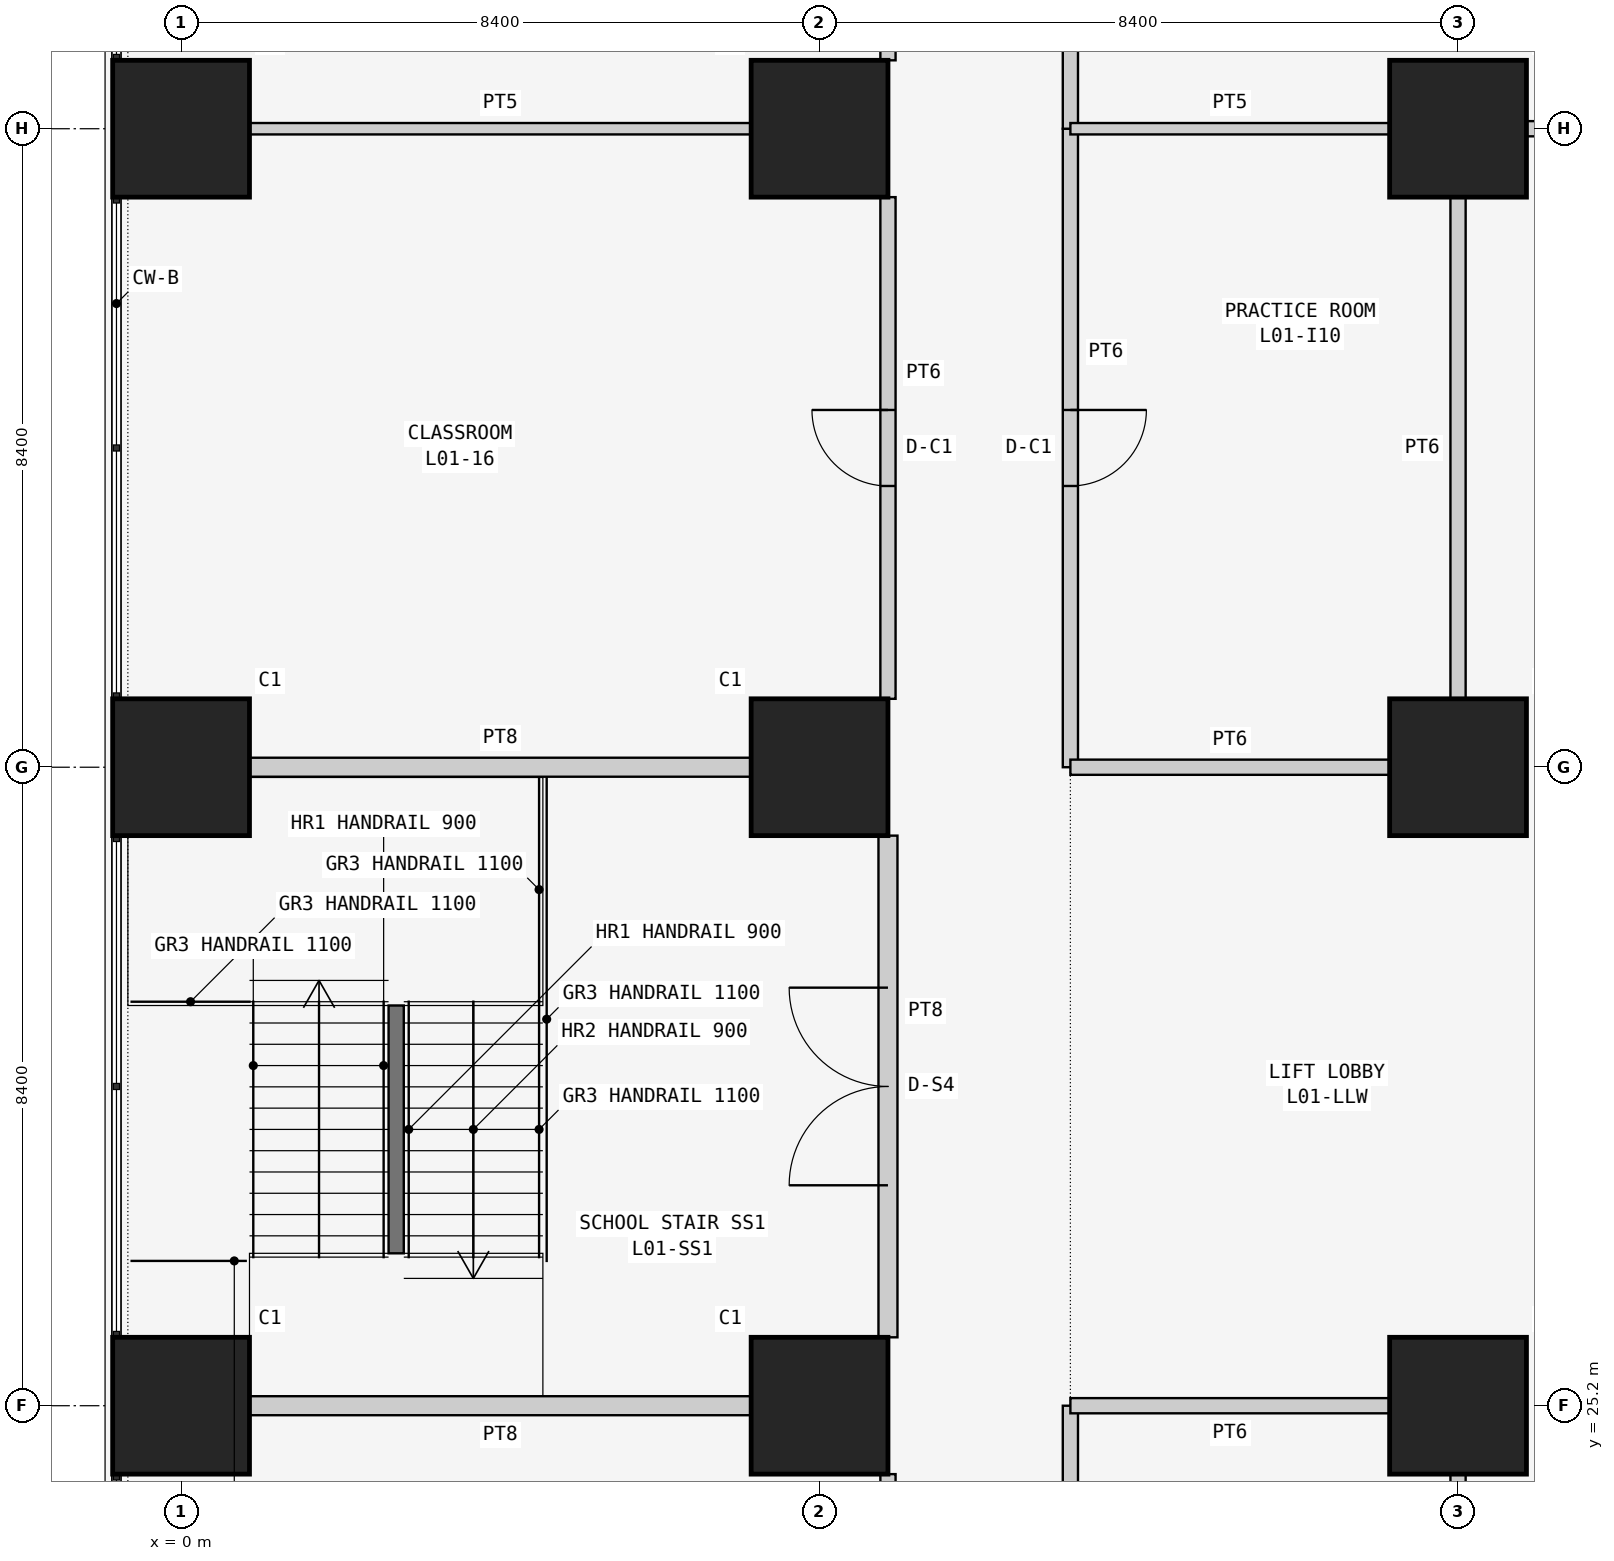
"""IFC4 building model, lengths in metres.
Left out: names, types, materials, properties, quantities, classifications, styles, units other than length and angle.
Written with IfcOpenShell. Run it as: python <this file> out.ifc"""

import sys

from ifc_helpers import new_model, si_unit, direction, frame, frame_2d, origin, origin_2d, place, context, subcontext, project, spatial, rectangle, extrude, element, fill, save


model = new_model("IFC4")
c1 = context("Model", 3, precision=1e-05, world=origin(), true_north=direction((0.0, 1.0)))
c2 = subcontext(c1, "Body", "Model", "MODEL_VIEW")
j1 = project(units=[si_unit("LENGTHUNIT", "METRE"), si_unit("PLANEANGLEUNIT", "RADIAN")], contexts=[c1])
p1 = place(None, origin())
s1 = spatial("IfcSite", under=j1, at=p1, CompositionType="ELEMENT")
p2 = place(p1, origin())
s2 = spatial("IfcBuilding", under=s1, at=p2, CompositionType="ELEMENT")
p3 = place(p2, frame((0.0, 0.0, 6.0)))
s3 = spatial("IfcBuildingStorey", under=s2, at=p3, CompositionType="ELEMENT", Elevation=6.0)
for number, where, z_axis, x_axis in (
    (1, (0.0, 25.2, 0.0), (0.0, 0.0, 1.0), (1.0, 0.0, 0.0)),
    (2, (0.0, 33.6, 0.0), (0.0, 0.0, 1.0), (1.0, 0.0, 0.0)),
    (3, (0.0, 42.0, 0.0), (0.0, 0.0, 1.0), (1.0, 0.0, 0.0)),
    (4, (8.4, 25.2, 0.0), (0.0, 0.0, 1.0), (1.0, 0.0, 0.0)),
    (5, (8.4, 33.6, 0.0), (0.0, 0.0, 1.0), (1.0, 0.0, 0.0)),
    (6, (8.4, 42.0, 0.0), (0.0, 0.0, 1.0), (1.0, 0.0, 0.0)),
    (7, (16.8, 25.2, 0.0), (0.0, 0.0, 1.0), (1.0, 0.0, 0.0)),
    (8, (16.8, 33.6, 0.0), (0.0, 0.0, 1.0), (1.0, 0.0, 0.0)),
    (9, (16.8, 42.0, 0.0), (0.0, 0.0, 1.0), (1.0, 0.0, 0.0)),
):
    element("IfcColumn", number, at=place(p3, frame(where, z_axis=z_axis, x_axis=x_axis)), inside=s3, PredefinedType="COLUMN", context=c2, shape_type="SweptSolid", body=[
        extrude(rectangle(XDim=1.8, YDim=1.8, at=origin_2d()), origin(), (0.0, 0.0, 1.0), 4.5),
    ])
for number, where, z_axis, x_axis in (
    (10, (7.5, 25.2, 0.0), (0.0, 0.0, 1.0), (-1.0, 0.0, 0.0)),
    (11, (0.9, 33.6, 0.0), (0.0, 0.0, 1.0), (1.0, 0.0, 0.0)),
):
    element("IfcWall", number, at=place(p3, frame(where, z_axis=z_axis, x_axis=x_axis)), inside=s3, PredefinedType="SOLIDWALL", context=c2, shape_type="SweptSolid", body=[
        extrude(rectangle(XDim=6.6, YDim=0.25, at=frame_2d((3.3, 0.0))), origin(), (0.0, 0.0, 1.0), 3.543),
    ])
p4 = place(p3, frame((9.3, 32.7, 0.0), z_axis=(0.0, 0.0, 1.0), x_axis=(0.0, -1.0, 0.0)))
e12 = element("IfcWall", 12, at=p4, inside=s3, PredefinedType="SOLIDWALL", context=c2, shape_type="SweptSolid", body=[
    extrude(rectangle(XDim=6.6, YDim=0.25, at=frame_2d((3.3, 0.0))), origin(), (0.0, 0.0, 1.0), 4.3),
])
p5 = place(p4, frame((2.0, 0.0, 0.0)))
e13 = element("IfcOpeningElement", 13, at=p5, cuts=e12, PredefinedType="OPENING", context=c2, shape_type="SweptSolid", body=[
    extrude(rectangle(XDim=2.6, YDim=2.4, at=frame_2d((1.3, 1.2))), frame((0.0, 0.135, 0.0), z_axis=(0.0, -1.0, 0.0), x_axis=(1.0, 0.0, 0.0)), (0.0, 0.0, 1.0), 0.27),
])
p6 = place(p3, frame((9.3, 24.3, 0.0), z_axis=(0.0, 0.0, 1.0), x_axis=(0.0, -1.0, 0.0)))
e14 = element("IfcWall", 14, at=p6, inside=s3, PredefinedType="PARTITIONING", context=c2, shape_type="SweptSolid", body=[
    extrude(rectangle(XDim=6.6, YDim=0.2, at=frame_2d((3.3, 0.0))), origin(), (0.0, 0.0, 1.0), 4.3),
])
p7 = place(p6, frame((2.8, 0.0, 0.0)))
e15 = element("IfcOpeningElement", 15, at=p7, cuts=e14, PredefinedType="OPENING", context=c2, shape_type="SweptSolid", body=[
    extrude(rectangle(XDim=1.0, YDim=2.1, at=frame_2d((0.5, 1.05))), frame((0.0, 0.11, 0.0), z_axis=(0.0, -1.0, 0.0), x_axis=(1.0, 0.0, 0.0)), (0.0, 0.0, 1.0), 0.22),
])
p8 = place(p3, frame((0.9, 42.0, 0.0), z_axis=(0.0, 0.0, 1.0), x_axis=(1.0, 0.0, 0.0)))
e16 = element("IfcWall", 16, at=p8, inside=s3, PredefinedType="PARTITIONING", context=c2, shape_type="SweptSolid", body=[
    extrude(rectangle(XDim=6.6, YDim=0.15, at=frame_2d((3.3, 0.0))), origin(), (0.0, 0.0, 1.0), 3.543),
])
p9 = place(p3, frame((9.3, 41.1, 0.0), z_axis=(0.0, 0.0, 1.0), x_axis=(0.0, -1.0, 0.0)))
e17 = element("IfcWall", 17, at=p9, inside=s3, PredefinedType="PARTITIONING", context=c2, shape_type="SweptSolid", body=[
    extrude(rectangle(XDim=6.6, YDim=0.2, at=frame_2d((3.3, 0.0))), origin(), (0.0, 0.0, 1.0), 4.3),
])
p10 = place(p9, frame((2.8, 0.0, 0.0)))
e18 = element("IfcOpeningElement", 18, at=p10, cuts=e17, PredefinedType="OPENING", context=c2, shape_type="SweptSolid", body=[
    extrude(rectangle(XDim=1.0, YDim=2.1, at=frame_2d((0.5, 1.05))), frame((0.0, 0.11, 0.0), z_axis=(0.0, -1.0, 0.0), x_axis=(1.0, 0.0, 0.0)), (0.0, 0.0, 1.0), 0.22),
])
p11 = place(p3, frame((9.3, 50.4, 0.0), z_axis=(0.0, 0.0, 1.0), x_axis=(0.0, -1.0, 0.0)))
e19 = element("IfcWall", 19, at=p11, inside=s3, PredefinedType="PARTITIONING", context=c2, shape_type="SweptSolid", body=[
    extrude(rectangle(XDim=7.5, YDim=0.2, at=frame_2d((3.75, 0.0))), origin(), (0.0, 0.0, 1.0), 4.3),
])
p12 = place(p11, frame((3.25, 0.0, 0.0)))
e20 = element("IfcOpeningElement", 20, at=p12, cuts=e19, PredefinedType="OPENING", context=c2, shape_type="SweptSolid", body=[
    extrude(rectangle(XDim=1.0, YDim=2.1, at=frame_2d((0.5, 1.05))), frame((0.0, 0.11, 0.0), z_axis=(0.0, -1.0, 0.0), x_axis=(1.0, 0.0, 0.0)), (0.0, 0.0, 1.0), 0.22),
])
p13 = place(p3, frame((11.7, 25.2, 0.0), z_axis=(0.0, 0.0, 1.0), x_axis=(0.0, -1.0, 0.0)))
e21 = element("IfcWall", 21, at=p13, inside=s3, PredefinedType="PARTITIONING", context=c2, shape_type="SweptSolid", body=[
    extrude(rectangle(XDim=8.4, YDim=0.2, at=frame_2d((4.2, 0.0))), origin(), (0.0, 0.0, 1.0), 4.3),
])
p14 = place(p13, frame((3.7, 0.0, 0.0)))
e22 = element("IfcOpeningElement", 22, at=p14, cuts=e21, PredefinedType="OPENING", context=c2, shape_type="SweptSolid", body=[
    extrude(rectangle(XDim=1.0, YDim=2.1, at=frame_2d((0.5, 1.05))), frame((0.0, 0.11, 0.0), z_axis=(0.0, -1.0, 0.0), x_axis=(1.0, 0.0, 0.0)), (0.0, 0.0, 1.0), 0.22),
])
p15 = place(p3, frame((11.7, 42.0, 0.0), z_axis=(0.0, 0.0, 1.0), x_axis=(0.0, -1.0, 0.0)))
e23 = element("IfcWall", 23, at=p15, inside=s3, PredefinedType="PARTITIONING", context=c2, shape_type="SweptSolid", body=[
    extrude(rectangle(XDim=8.4, YDim=0.2, at=frame_2d((4.2, 0.0))), origin(), (0.0, 0.0, 1.0), 4.3),
])
p16 = place(p15, frame((3.7, 0.0, 0.0)))
e24 = element("IfcOpeningElement", 24, at=p16, cuts=e23, PredefinedType="OPENING", context=c2, shape_type="SweptSolid", body=[
    extrude(rectangle(XDim=1.0, YDim=2.1, at=frame_2d((0.5, 1.05))), frame((0.0, 0.11, 0.0), z_axis=(0.0, -1.0, 0.0), x_axis=(1.0, 0.0, 0.0)), (0.0, 0.0, 1.0), 0.22),
])
p17 = place(p3, frame((11.7, 47.1, 0.0), z_axis=(0.0, 0.0, 1.0), x_axis=(0.0, -1.0, 0.0)))
e25 = element("IfcWall", 25, at=p17, inside=s3, PredefinedType="PARTITIONING", context=c2, shape_type="SweptSolid", body=[
    extrude(rectangle(XDim=5.1, YDim=0.2, at=frame_2d((2.55, 0.0))), origin(), (0.0, 0.0, 1.0), 4.3),
])
p18 = place(p3, frame((15.9, 25.2, 0.0), z_axis=(0.0, 0.0, 1.0), x_axis=(-1.0, 0.0, 0.0)))
e26 = element("IfcWall", 26, at=p18, inside=s3, PredefinedType="PARTITIONING", context=c2, shape_type="SweptSolid", body=[
    extrude(rectangle(XDim=4.2, YDim=0.2, at=frame_2d((2.1, 0.0))), origin(), (0.0, 0.0, 1.0), 3.543),
])
p19 = place(p3, frame((16.8, 17.7, 0.0), z_axis=(0.0, 0.0, 1.0), x_axis=(0.0, 1.0, 0.0)))
e27 = element("IfcWall", 27, at=p19, inside=s3, PredefinedType="PARTITIONING", context=c2, shape_type="SweptSolid", body=[
    extrude(rectangle(XDim=6.6, YDim=0.2, at=frame_2d((3.3, 0.0))), origin(), (0.0, 0.0, 1.0), 3.543),
])
p20 = place(p3, frame((11.7, 33.6, 0.0), z_axis=(0.0, 0.0, 1.0), x_axis=(1.0, 0.0, 0.0)))
e28 = element("IfcWall", 28, at=p20, inside=s3, PredefinedType="PARTITIONING", context=c2, shape_type="SweptSolid", body=[
    extrude(rectangle(XDim=4.2, YDim=0.2, at=frame_2d((2.1, 0.0))), origin(), (0.0, 0.0, 1.0), 3.543),
])
p21 = place(p3, frame((16.8, 34.5, 0.0), z_axis=(0.0, 0.0, 1.0), x_axis=(0.0, 1.0, 0.0)))
e29 = element("IfcWall", 29, at=p21, inside=s3, PredefinedType="PARTITIONING", context=c2, shape_type="SweptSolid", body=[
    extrude(rectangle(XDim=6.6, YDim=0.2, at=frame_2d((3.3, 0.0))), origin(), (0.0, 0.0, 1.0), 3.543),
])
p22 = place(p3, frame((17.7, 42.0, 0.0), z_axis=(0.0, 0.0, 1.0), x_axis=(1.0, 0.0, 0.0)))
e30 = element("IfcWall", 30, at=p22, inside=s3, PredefinedType="PARTITIONING", context=c2, shape_type="SweptSolid", body=[
    extrude(rectangle(XDim=2.8, YDim=0.2, at=frame_2d((1.4, 0.0))), origin(), (0.0, 0.0, 1.0), 3.543),
])
p23 = place(p3, frame((11.7, 42.0, 0.0), z_axis=(0.0, 0.0, 1.0), x_axis=(1.0, 0.0, 0.0)))
e31 = element("IfcWall", 31, at=p23, inside=s3, PredefinedType="PARTITIONING", context=c2, shape_type="SweptSolid", body=[
    extrude(rectangle(XDim=4.2, YDim=0.15, at=frame_2d((2.1, 0.0))), origin(), (0.0, 0.0, 1.0), 3.543),
])
p24 = place(p3, frame((2.83, 27.205, 0.0), z_axis=(0.0, 0.0, 1.0), x_axis=(0.0, 1.0, 0.0)))
e32 = element("IfcWall", 32, at=p24, inside=s3, PredefinedType="SOLIDWALL", context=c2, shape_type="SweptSolid", body=[
    extrude(rectangle(XDim=3.26, YDim=0.2, at=frame_2d((1.63, 0.0))), origin(), (0.0, 0.0, 1.0), 4.5),
])
p25 = place(p5, frame((2.6, 0.0, 0.0), z_axis=(0.0, 0.0, 1.0), x_axis=(-1.0, 0.0, 0.0)))
e33 = element("IfcDoor", 33, at=p25, inside=s3, OperationType="DOUBLE_DOOR_SINGLE_SWING", PredefinedType="DOOR", context=c2, shape_type="SweptSolid", body=[
    extrude(rectangle(XDim=2.6, YDim=2.4, at=frame_2d((1.3, 1.2))), frame((0.0, 0.025, 0.0), z_axis=(0.0, -1.0, 0.0), x_axis=(1.0, 0.0, 0.0)), (0.0, 0.0, 1.0), 0.05),
])
fill(e13, e33)
p26 = place(p10, frame((1.0, 0.0, 0.0), z_axis=(0.0, 0.0, 1.0), x_axis=(-1.0, 0.0, 0.0)))
e34 = element("IfcDoor", 34, at=p26, inside=s3, OperationType="SINGLE_SWING_RIGHT", PredefinedType="DOOR", context=c2, shape_type="SweptSolid", body=[
    extrude(rectangle(XDim=1.0, YDim=2.1, at=frame_2d((0.5, 1.05))), frame((0.0, 0.025, 0.0), z_axis=(0.0, -1.0, 0.0), x_axis=(1.0, 0.0, 0.0)), (0.0, 0.0, 1.0), 0.05),
])
fill(e18, e34)
p27 = place(p16, origin())
e35 = element("IfcDoor", 35, at=p27, inside=s3, OperationType="SINGLE_SWING_LEFT", PredefinedType="DOOR", context=c2, shape_type="SweptSolid", body=[
    extrude(rectangle(XDim=1.0, YDim=2.1, at=frame_2d((0.5, 1.05))), frame((0.0, 0.025, 0.0), z_axis=(0.0, -1.0, 0.0), x_axis=(1.0, 0.0, 0.0)), (0.0, 0.0, 1.0), 0.05),
])
fill(e24, e35)
save(model, sys.argv[1])
